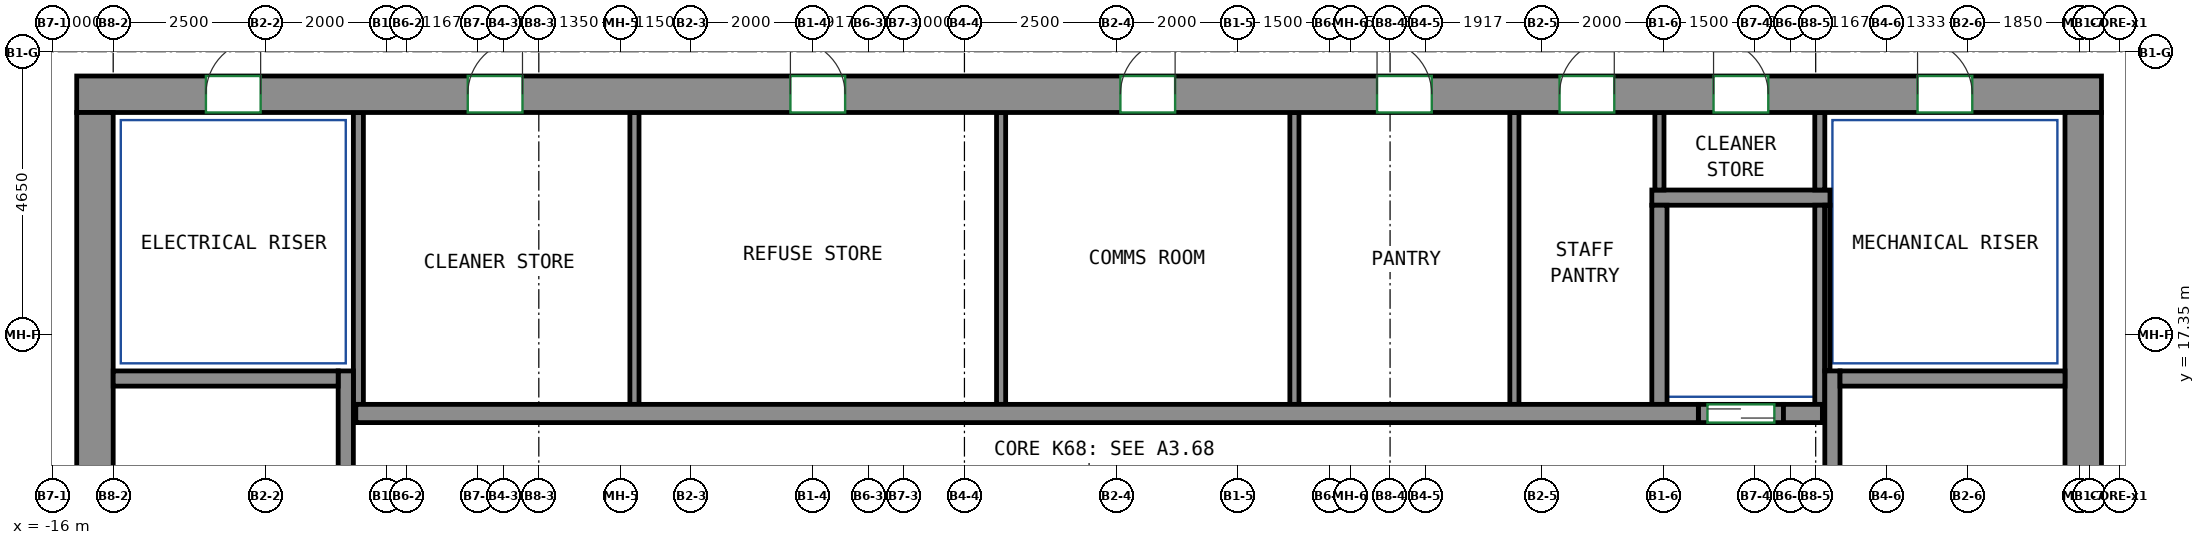
"""IFC4 building model, lengths in metres.
Left out: names, types, materials, properties, quantities, classifications, styles, units other than length and angle.
Written with IfcOpenShell. Run it as: python <this file> out.ifc"""

import sys

from ifc_helpers import new_model, si_unit, direction, frame, frame_2d, origin, place, context, subcontext, project, spatial, rectangle, extrude, source, transform, mapped, element, fill, save


model = new_model("IFC4")
c1 = context("Model", 3, precision=1e-05, world=origin(), true_north=direction((0.0, 1.0)))
c2 = subcontext(c1, "Body", "Model", "MODEL_VIEW")
j1 = project(units=[si_unit("LENGTHUNIT", "METRE"), si_unit("PLANEANGLEUNIT", "RADIAN")], contexts=[c1])
p1 = place(None, origin())
s1 = spatial("IfcSite", under=j1, at=p1, CompositionType="ELEMENT")
p2 = place(p1, origin())
s2 = spatial("IfcBuilding", under=s1, at=p2, CompositionType="ELEMENT")
p3 = place(p2, frame((0.0, 0.0, 273.8)))
s3 = spatial("IfcBuildingStorey", under=s2, at=p3, CompositionType="ELEMENT", Elevation=273.8)
m1 = source(origin(), c2, "Body", "SweptSolid", [
    extrude(rectangle(XDim=33.3, YDim=0.6, at=frame_2d((16.65, 0.0))), origin(), (0.0, 0.0, 1.0), 3.12),
])
p4 = place(p3, frame((-15.6, 21.3, 0.0), z_axis=(0.0, 0.0, 1.0), x_axis=(1.0, 0.0, 0.0)))
e1 = element("IfcWall", 1, at=p4, inside=s3, PredefinedType="SHEAR", context=c2, shape_type="MappedRepresentation", body=[
    mapped(m1, transform((0.0, 0.0, 0.0))),
])
p5 = place(p4, frame((6.431, 0.0, 0.0)))
e2 = element("IfcOpeningElement", 2, at=p5, cuts=e1, PredefinedType="OPENING", context=c2, shape_type="SweptSolid", body=[
    extrude(rectangle(XDim=0.9, YDim=2.1, at=frame_2d((0.45, 1.05))), frame((0.0, 0.31, 0.0), z_axis=(0.0, -1.0, 0.0), x_axis=(1.0, 0.0, 0.0)), (0.0, 0.0, 1.0), 0.62),
])
p6 = place(p4, frame((11.738, 0.0, 0.0)))
e3 = element("IfcOpeningElement", 3, at=p6, cuts=e1, PredefinedType="OPENING", context=c2, shape_type="SweptSolid", body=[
    extrude(rectangle(XDim=0.9, YDim=2.1, at=frame_2d((0.45, 1.05))), frame((0.0, 0.31, 0.0), z_axis=(0.0, -1.0, 0.0), x_axis=(1.0, 0.0, 0.0)), (0.0, 0.0, 1.0), 0.62),
])
p7 = place(p4, frame((17.165, 0.0, 0.0)))
e4 = element("IfcOpeningElement", 4, at=p7, cuts=e1, PredefinedType="OPENING", context=c2, shape_type="SweptSolid", body=[
    extrude(rectangle(XDim=0.9, YDim=2.1, at=frame_2d((0.45, 1.05))), frame((0.0, 0.31, 0.0), z_axis=(0.0, -1.0, 0.0), x_axis=(1.0, 0.0, 0.0)), (0.0, 0.0, 1.0), 0.62),
])
p8 = place(p4, frame((21.386, 0.0, 0.0)))
e5 = element("IfcOpeningElement", 5, at=p8, cuts=e1, PredefinedType="OPENING", context=c2, shape_type="SweptSolid", body=[
    extrude(rectangle(XDim=0.9, YDim=2.1, at=frame_2d((0.45, 1.05))), frame((0.0, 0.31, 0.0), z_axis=(0.0, -1.0, 0.0), x_axis=(1.0, 0.0, 0.0)), (0.0, 0.0, 1.0), 0.62),
])
p9 = place(p4, frame((24.387, 0.0, 0.0)))
e6 = element("IfcOpeningElement", 6, at=p9, cuts=e1, PredefinedType="OPENING", context=c2, shape_type="SweptSolid", body=[
    extrude(rectangle(XDim=0.9, YDim=2.1, at=frame_2d((0.45, 1.05))), frame((0.0, 0.31, 0.0), z_axis=(0.0, -1.0, 0.0), x_axis=(1.0, 0.0, 0.0)), (0.0, 0.0, 1.0), 0.62),
])
p10 = place(p4, frame((26.92, 0.0, 0.0)))
e7 = element("IfcOpeningElement", 7, at=p10, cuts=e1, PredefinedType="OPENING", context=c2, shape_type="SweptSolid", body=[
    extrude(rectangle(XDim=0.9, YDim=2.1, at=frame_2d((0.45, 1.05))), frame((0.0, 0.31, 0.0), z_axis=(0.0, -1.0, 0.0), x_axis=(1.0, 0.0, 0.0)), (0.0, 0.0, 1.0), 0.62),
])
p11 = place(p4, frame((2.125, 0.0, 0.0)))
e8 = element("IfcOpeningElement", 8, at=p11, cuts=e1, PredefinedType="OPENING", context=c2, shape_type="SweptSolid", body=[
    extrude(rectangle(XDim=0.9, YDim=2.1, at=frame_2d((0.45, 1.05))), frame((0.0, 0.31, 0.0), z_axis=(0.0, -1.0, 0.0), x_axis=(1.0, 0.0, 0.0)), (0.0, 0.0, 1.0), 0.62),
])
p12 = place(p4, frame((30.275, 0.0, 0.0)))
e9 = element("IfcOpeningElement", 9, at=p12, cuts=e1, PredefinedType="OPENING", context=c2, shape_type="SweptSolid", body=[
    extrude(rectangle(XDim=0.9, YDim=2.1, at=frame_2d((0.45, 1.05))), frame((0.0, 0.31, 0.0), z_axis=(0.0, -1.0, 0.0), x_axis=(1.0, 0.0, 0.0)), (0.0, 0.0, 1.0), 0.62),
])
m2 = source(origin(), c2, "Body", "SweptSolid", [
    extrude(rectangle(XDim=12.0, YDim=0.6, at=frame_2d((6.0, 0.0))), origin(), (0.0, 0.0, 1.0), 3.12),
])
for number, where, z_axis, x_axis in (
    (10, (-15.3, 9.0, 0.0), (0.0, 0.0, 1.0), (0.0, 1.0, 0.0)),
    (11, (17.4, 9.0, 0.0), (0.0, 0.0, 1.0), (0.0, 1.0, 0.0)),
):
    element("IfcWall", number, at=place(p3, frame(where, z_axis=z_axis, x_axis=x_axis)), inside=s3, PredefinedType="SHEAR", context=c2, shape_type="MappedRepresentation", body=[
        mapped(m2, transform((0.0, 0.0, 0.0))),
    ])
m3 = source(origin(), c2, "Body", "SweptSolid", [
    extrude(rectangle(XDim=7.75, YDim=0.25, at=frame_2d((3.875, 0.0))), origin(), (0.0, 0.0, 1.0), 3.12),
])
p13 = place(p3, frame((-11.175, 9.0, 0.0), z_axis=(0.0, 0.0, 1.0), x_axis=(0.0, 1.0, 0.0)))
e12 = element("IfcWall", 12, at=p13, inside=s3, PredefinedType="SHEAR", context=c2, shape_type="MappedRepresentation", body=[
    mapped(m3, transform((0.0, 0.0, 0.0))),
])
m4 = source(origin(), c2, "Body", "SweptSolid", [
    extrude(rectangle(XDim=3.7, YDim=0.25, at=frame_2d((1.85, 0.0))), origin(), (0.0, 0.0, 1.0), 3.12),
])
p14 = place(p3, frame((-15.0, 16.625, 0.0), z_axis=(0.0, 0.0, 1.0), x_axis=(1.0, 0.0, 0.0)))
e13 = element("IfcWall", 13, at=p14, inside=s3, PredefinedType="SHEAR", context=c2, shape_type="MappedRepresentation", body=[
    mapped(m4, transform((0.0, 0.0, 0.0))),
])
p15 = place(p3, frame((13.275, 9.0, 0.0), z_axis=(0.0, 0.0, 1.0), x_axis=(0.0, 1.0, 0.0)))
e14 = element("IfcWall", 14, at=p15, inside=s3, PredefinedType="SHEAR", context=c2, shape_type="MappedRepresentation", body=[
    mapped(m3, transform((0.0, 0.0, 0.0))),
])
m5 = source(origin(), c2, "Body", "SweptSolid", [
    extrude(rectangle(XDim=3.7, YDim=0.25, at=frame_2d((1.85, 0.0))), origin(), (0.0, 0.0, 1.0), 3.12),
])
p16 = place(p3, frame((13.4, 16.625, 0.0), z_axis=(0.0, 0.0, 1.0), x_axis=(1.0, 0.0, 0.0)))
e15 = element("IfcWall", 15, at=p16, inside=s3, PredefinedType="SHEAR", context=c2, shape_type="MappedRepresentation", body=[
    mapped(m5, transform((0.0, 0.0, 0.0))),
])
m6 = source(origin(), c2, "Body", "SweptSolid", [
    extrude(rectangle(XDim=22.08, YDim=0.3, at=frame_2d((11.04, 0.0))), origin(), (0.0, 0.0, 1.0), 3.12),
])
p17 = place(p3, frame((-11.01, 16.05, 0.0), z_axis=(0.0, 0.0, 1.0), x_axis=(1.0, 0.0, 0.0)))
e16 = element("IfcWall", 16, at=p17, inside=s3, PredefinedType="SHEAR", context=c2, shape_type="MappedRepresentation", body=[
    mapped(m6, transform((0.0, 0.0, 0.0))),
])
m7 = source(origin(), c2, "Body", "SweptSolid", [
    extrude(rectangle(XDim=0.64, YDim=0.3, at=frame_2d((0.32, 0.0))), origin(), (0.0, 0.0, 1.0), 3.12),
])
p18 = place(p3, frame((12.47, 16.05, 0.0), z_axis=(0.0, 0.0, 1.0), x_axis=(1.0, 0.0, 0.0)))
e17 = element("IfcWall", 17, at=p18, inside=s3, PredefinedType="SHEAR", context=c2, shape_type="MappedRepresentation", body=[
    mapped(m7, transform((0.0, 0.0, 0.0))),
])
m8 = source(origin(), c2, "Body", "SweptSolid", [
    extrude(rectangle(XDim=1.4, YDim=0.3, at=frame_2d((0.7, 0.0))), origin(), (0.0, 0.0, 1.0), 3.12),
])
p19 = place(p3, frame((11.07, 16.05, 0.0), z_axis=(0.0, 0.0, 1.0), x_axis=(1.0, 0.0, 0.0)))
e18 = element("IfcWall", 18, at=p19, inside=s3, PredefinedType="PARTITIONING", context=c2, shape_type="MappedRepresentation", body=[
    mapped(m8, transform((0.0, 0.0, 0.0))),
])
p20 = place(p19, frame((0.15, 0.0, 0.0)))
e19 = element("IfcOpeningElement", 19, at=p20, cuts=e18, PredefinedType="OPENING", context=c2, shape_type="SweptSolid", body=[
    extrude(rectangle(XDim=1.1, YDim=2.1, at=frame_2d((0.55, 1.05))), frame((0.0, 0.16, 0.0), z_axis=(0.0, -1.0, 0.0), x_axis=(1.0, 0.0, 0.0)), (0.0, 0.0, 1.0), 0.32),
])
m9 = source(origin(), c2, "Body", "SweptSolid", [
    extrude(rectangle(XDim=2.93, YDim=0.25, at=frame_2d((1.465, 0.0))), origin(), (0.0, 0.0, 1.0), 3.12),
])
p21 = place(p3, frame((10.305, 19.6, 0.0), z_axis=(0.0, 0.0, 1.0), x_axis=(1.0, 0.0, 0.0)))
e20 = element("IfcWall", 20, at=p21, inside=s3, PredefinedType="PARTITIONING", context=c2, shape_type="MappedRepresentation", body=[
    mapped(m9, transform((0.0, 0.0, 0.0))),
])
m10 = source(origin(), c2, "Body", "SweptSolid", [
    extrude(rectangle(XDim=3.275, YDim=0.165, at=frame_2d((1.638, 0.0))), origin(), (0.0, 0.0, 1.0), 3.12),
])
p22 = place(p3, frame((13.067, 16.2, 0.0), z_axis=(0.0, 0.0, 1.0), x_axis=(0.0, 1.0, 0.0)))
e21 = element("IfcWall", 21, at=p22, inside=s3, PredefinedType="PARTITIONING", context=c2, shape_type="MappedRepresentation", body=[
    mapped(m10, transform((0.0, 0.0, 0.0))),
])
m11 = source(origin(), c2, "Body", "SweptSolid", [
    extrude(rectangle(XDim=1.275, YDim=0.165, at=frame_2d((0.637, 0.0))), origin(), (0.0, 0.0, 1.0), 3.12),
])
p23 = place(p3, frame((13.067, 19.725, 0.0), z_axis=(0.0, 0.0, 1.0), x_axis=(0.0, 1.0, 0.0)))
e22 = element("IfcWall", 22, at=p23, inside=s3, PredefinedType="PARTITIONING", context=c2, shape_type="MappedRepresentation", body=[
    mapped(m11, transform((0.0, 0.0, 0.0))),
])
m12 = source(origin(), c2, "Body", "SweptSolid", [
    extrude(rectangle(XDim=4.8, YDim=0.165, at=frame_2d((2.4, 0.0))), origin(), (0.0, 0.0, 1.0), 3.12),
])
p24 = place(p3, frame((-10.968, 16.2, 0.0), z_axis=(0.0, 0.0, 1.0), x_axis=(0.0, 1.0, 0.0)))
e23 = element("IfcWall", 23, at=p24, inside=s3, PredefinedType="PARTITIONING", context=c2, shape_type="MappedRepresentation", body=[
    mapped(m12, transform((0.0, 0.0, 0.0))),
])
m13 = source(origin(), c2, "Body", "SweptSolid", [
    extrude(rectangle(XDim=3.275, YDim=0.25, at=frame_2d((1.638, 0.0))), origin(), (0.0, 0.0, 1.0), 3.12),
])
p25 = place(p3, frame((10.43, 16.2, 0.0), z_axis=(0.0, 0.0, 1.0), x_axis=(0.0, 1.0, 0.0)))
e24 = element("IfcWall", 24, at=p25, inside=s3, PredefinedType="PARTITIONING", context=c2, shape_type="MappedRepresentation", body=[
    mapped(m13, transform((0.0, 0.0, 0.0))),
])
m14 = source(origin(), c2, "Body", "SweptSolid", [
    extrude(rectangle(XDim=2.725, YDim=0.085, at=frame_2d((1.363, 0.0))), origin(), (0.0, 0.0, 1.0), 3.12),
])
p26 = place(p3, frame((13.192, 16.75, 0.0), z_axis=(0.0, 0.0, 1.0), x_axis=(0.0, 1.0, 0.0)))
e25 = element("IfcWall", 25, at=p26, inside=s3, PredefinedType="PARTITIONING", context=c2, shape_type="MappedRepresentation", body=[
    mapped(m14, transform((0.0, 0.0, 0.0))),
])
m15 = source(origin(), c2, "Body", "SweptSolid", [
    extrude(rectangle(XDim=4.8, YDim=0.15, at=frame_2d((2.4, 0.0))), origin(), (0.0, 0.0, 1.0), 3.12),
])
for number, where, z_axis, x_axis in (
    (26, (-6.427, 16.2, 0.0), (0.0, 0.0, 1.0), (0.0, 1.0, 0.0)),
    (27, (-0.397, 16.2, 0.0), (0.0, 0.0, 1.0), (0.0, 1.0, 0.0)),
    (28, (4.427, 16.2, 0.0), (0.0, 0.0, 1.0), (0.0, 1.0, 0.0)),
    (29, (8.045, 16.2, 0.0), (0.0, 0.0, 1.0), (0.0, 1.0, 0.0)),
):
    element("IfcWall", number, at=place(p3, frame(where, z_axis=z_axis, x_axis=x_axis)), inside=s3, PredefinedType="PARTITIONING", context=c2, shape_type="MappedRepresentation", body=[
        mapped(m15, transform((0.0, 0.0, 0.0))),
    ])
m16 = source(origin(), c2, "Body", "SweptSolid", [
    extrude(rectangle(XDim=1.275, YDim=0.15, at=frame_2d((0.637, 0.0))), origin(), (0.0, 0.0, 1.0), 3.12),
])
p27 = place(p3, frame((10.43, 19.725, 0.0), z_axis=(0.0, 0.0, 1.0), x_axis=(0.0, 1.0, 0.0)))
e30 = element("IfcWall", 30, at=p27, inside=s3, PredefinedType="PARTITIONING", context=c2, shape_type="MappedRepresentation", body=[
    mapped(m16, transform((0.0, 0.0, 0.0))),
])
p28 = place(p20, origin())
e31 = element("IfcDoor", 31, at=p28, inside=s3, OperationType="DOUBLE_DOOR_SLIDING", PredefinedType="DOOR", context=c2, shape_type="SweptSolid", body=[
    extrude(rectangle(XDim=1.1, YDim=2.1, at=frame_2d((0.55, 1.05))), frame((0.0, 0.025, 0.0), z_axis=(0.0, -1.0, 0.0), x_axis=(1.0, 0.0, 0.0)), (0.0, 0.0, 1.0), 0.05),
])
fill(e19, e31)
p29 = place(p5, origin())
e32 = element("IfcDoor", 32, at=p29, inside=s3, OperationType="SINGLE_SWING_RIGHT", PredefinedType="DOOR", context=c2, shape_type="SweptSolid", body=[
    extrude(rectangle(XDim=0.9, YDim=2.1, at=frame_2d((0.45, 1.05))), frame((0.0, -0.155, 0.0), z_axis=(0.0, -1.0, 0.0), x_axis=(1.0, 0.0, 0.0)), (0.0, 0.0, 1.0), 0.05),
])
fill(e2, e32)
p30 = place(p6, origin())
e33 = element("IfcDoor", 33, at=p30, inside=s3, OperationType="SINGLE_SWING_LEFT", PredefinedType="DOOR", context=c2, shape_type="SweptSolid", body=[
    extrude(rectangle(XDim=0.9, YDim=2.1, at=frame_2d((0.45, 1.05))), frame((0.0, -0.155, 0.0), z_axis=(0.0, -1.0, 0.0), x_axis=(1.0, 0.0, 0.0)), (0.0, 0.0, 1.0), 0.05),
])
fill(e3, e33)
p31 = place(p7, origin())
e34 = element("IfcDoor", 34, at=p31, inside=s3, OperationType="SINGLE_SWING_RIGHT", PredefinedType="DOOR", context=c2, shape_type="SweptSolid", body=[
    extrude(rectangle(XDim=0.9, YDim=2.1, at=frame_2d((0.45, 1.05))), frame((0.0, -0.155, 0.0), z_axis=(0.0, -1.0, 0.0), x_axis=(1.0, 0.0, 0.0)), (0.0, 0.0, 1.0), 0.05),
])
fill(e4, e34)
p32 = place(p8, origin())
e35 = element("IfcDoor", 35, at=p32, inside=s3, OperationType="SINGLE_SWING_LEFT", PredefinedType="DOOR", context=c2, shape_type="SweptSolid", body=[
    extrude(rectangle(XDim=0.9, YDim=2.1, at=frame_2d((0.45, 1.05))), frame((0.0, -0.155, 0.0), z_axis=(0.0, -1.0, 0.0), x_axis=(1.0, 0.0, 0.0)), (0.0, 0.0, 1.0), 0.05),
])
fill(e5, e35)
p33 = place(p9, origin())
e36 = element("IfcDoor", 36, at=p33, inside=s3, OperationType="SINGLE_SWING_RIGHT", PredefinedType="DOOR", context=c2, shape_type="SweptSolid", body=[
    extrude(rectangle(XDim=0.9, YDim=2.1, at=frame_2d((0.45, 1.05))), frame((0.0, -0.155, 0.0), z_axis=(0.0, -1.0, 0.0), x_axis=(1.0, 0.0, 0.0)), (0.0, 0.0, 1.0), 0.05),
])
fill(e6, e36)
p34 = place(p10, origin())
e37 = element("IfcDoor", 37, at=p34, inside=s3, OperationType="SINGLE_SWING_LEFT", PredefinedType="DOOR", context=c2, shape_type="SweptSolid", body=[
    extrude(rectangle(XDim=0.9, YDim=2.1, at=frame_2d((0.45, 1.05))), frame((0.0, -0.155, 0.0), z_axis=(0.0, -1.0, 0.0), x_axis=(1.0, 0.0, 0.0)), (0.0, 0.0, 1.0), 0.05),
])
fill(e7, e37)
p35 = place(p11, origin())
e38 = element("IfcDoor", 38, at=p35, inside=s3, OperationType="SINGLE_SWING_RIGHT", PredefinedType="DOOR", context=c2, shape_type="SweptSolid", body=[
    extrude(rectangle(XDim=0.9, YDim=2.1, at=frame_2d((0.45, 1.05))), frame((0.0, -0.155, 0.0), z_axis=(0.0, -1.0, 0.0), x_axis=(1.0, 0.0, 0.0)), (0.0, 0.0, 1.0), 0.05),
])
fill(e8, e38)
p36 = place(p12, origin())
e39 = element("IfcDoor", 39, at=p36, inside=s3, OperationType="SINGLE_SWING_LEFT", PredefinedType="DOOR", context=c2, shape_type="SweptSolid", body=[
    extrude(rectangle(XDim=0.9, YDim=2.1, at=frame_2d((0.45, 1.05))), frame((0.0, -0.155, 0.0), z_axis=(0.0, -1.0, 0.0), x_axis=(1.0, 0.0, 0.0)), (0.0, 0.0, 1.0), 0.05),
])
fill(e9, e39)
save(model, sys.argv[1])
